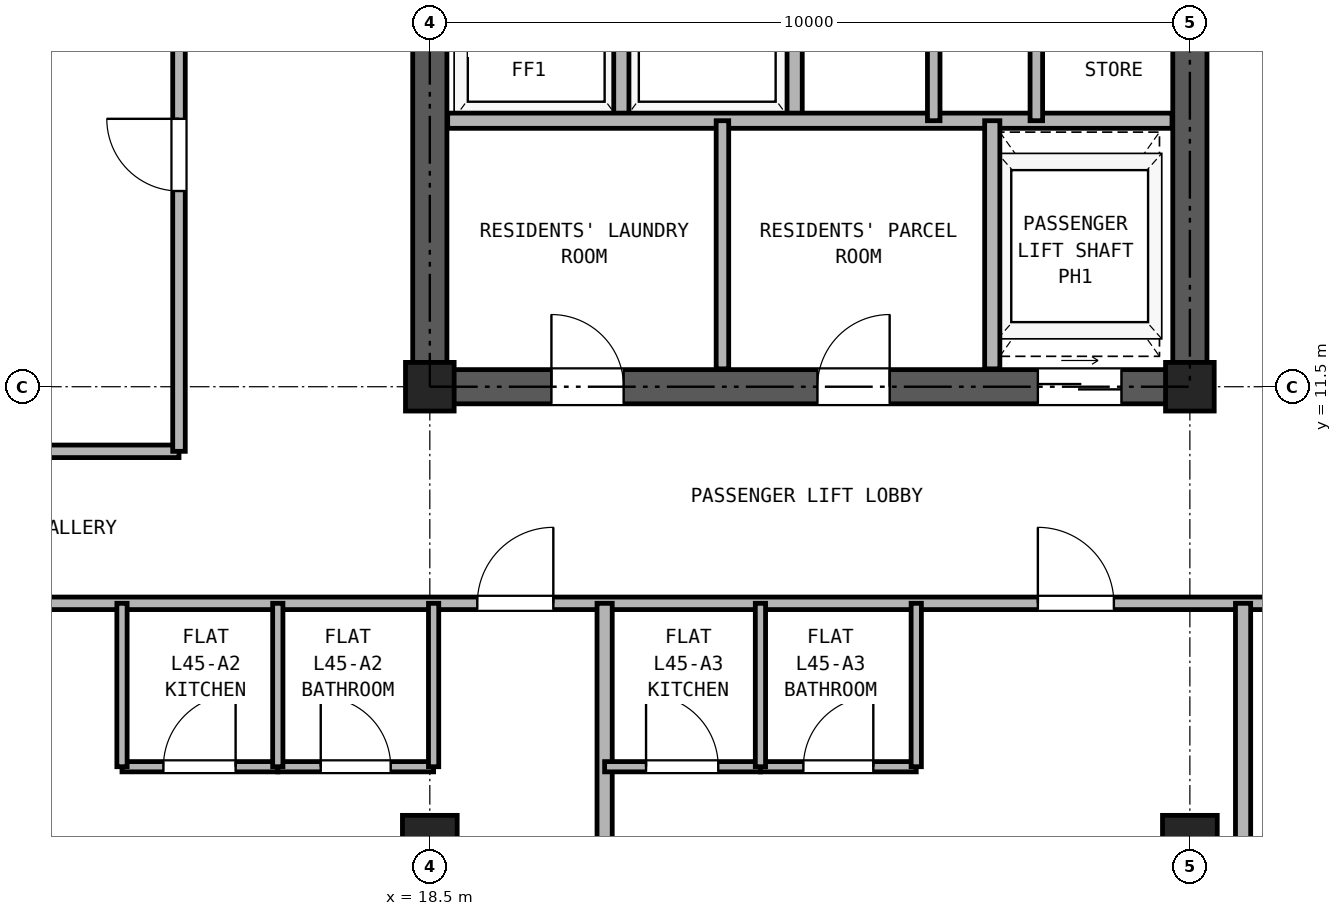
"""IFC4 building model, lengths in metres.
Left out: names, types, materials, properties, quantities, classifications, styles, units other than length and angle.
Written with IfcOpenShell. Run it as: python <this file> out.ifc"""

import sys

from ifc_helpers import new_model, si_unit, direction, frame, frame_2d, origin, origin_2d, place, context, subcontext, project, spatial, rectangle, hollow_rectangle, extrude, source, transform, mapped, element, fill, save


model = new_model("IFC4")
c1 = context("Model", 3, precision=1e-05, world=origin(), true_north=direction((0.0, 1.0)))
c2 = subcontext(c1, "Body", "Model", "MODEL_VIEW")
j1 = project(units=[si_unit("LENGTHUNIT", "METRE"), si_unit("PLANEANGLEUNIT", "RADIAN")], contexts=[c1])
p1 = place(None, origin())
s1 = spatial("IfcSite", under=j1, at=p1, CompositionType="ELEMENT")
p2 = place(p1, origin())
s2 = spatial("IfcBuilding", under=s1, at=p2, CompositionType="ELEMENT")
p3 = place(p2, frame((0.0, 0.0, 162.5)))
s3 = spatial("IfcBuildingStorey", under=s2, at=p3, CompositionType="ELEMENT", Elevation=162.5)
m1 = source(origin(), c2, "Body", "SweptSolid", [
    extrude(hollow_rectangle(XDim=0.72, YDim=0.72, WallThickness=0.04, at=origin_2d()), origin(), (0.0, 0.0, 1.0), 2.95),
])
p4 = place(p3, frame((18.5, 5.5, 0.0), z_axis=(0.0, 0.0, 1.0), x_axis=(1.0, 0.0, 0.0)))
e1 = element("IfcColumn", 1, at=p4, inside=s3, PredefinedType="COLUMN", context=c2, shape_type="MappedRepresentation", body=[
    mapped(m1, transform((0.0, 0.0, 0.0), x_axis=(1.0, 0.0, 0.0), y_axis=(0.0, 1.0, 0.0), z_axis=(0.0, 0.0, 1.0), scale=1.0)),
])
m2 = source(origin(), c2, "Body", "SweptSolid", [
    extrude(hollow_rectangle(XDim=0.64, YDim=0.64, WallThickness=0.035, at=origin_2d()), origin(), (0.0, 0.0, 1.0), 2.95),
])
p5 = place(p3, frame((18.5, 11.5, 0.0), z_axis=(0.0, 0.0, 1.0), x_axis=(1.0, 0.0, 0.0)))
e2 = element("IfcColumn", 2, at=p5, inside=s3, PredefinedType="COLUMN", context=c2, shape_type="MappedRepresentation", body=[
    mapped(m2, transform((0.0, 0.0, 0.0), x_axis=(1.0, 0.0, 0.0), y_axis=(0.0, 1.0, 0.0), z_axis=(0.0, 0.0, 1.0), scale=1.0)),
])
p6 = place(p3, frame((28.5, 5.5, 0.0), z_axis=(0.0, 0.0, 1.0), x_axis=(1.0, 0.0, 0.0)))
e3 = element("IfcColumn", 3, at=p6, inside=s3, PredefinedType="COLUMN", context=c2, shape_type="MappedRepresentation", body=[
    mapped(m1, transform((0.0, 0.0, 0.0), x_axis=(1.0, 0.0, 0.0), y_axis=(0.0, 1.0, 0.0), z_axis=(0.0, 0.0, 1.0), scale=1.0)),
])
p7 = place(p3, frame((28.5, 11.5, 0.0), z_axis=(0.0, 0.0, 1.0), x_axis=(1.0, 0.0, 0.0)))
e4 = element("IfcColumn", 4, at=p7, inside=s3, PredefinedType="COLUMN", context=c2, shape_type="MappedRepresentation", body=[
    mapped(m2, transform((0.0, 0.0, 0.0), x_axis=(1.0, 0.0, 0.0), y_axis=(0.0, 1.0, 0.0), z_axis=(0.0, 0.0, 1.0), scale=1.0)),
])
p8 = place(p3, frame((18.275, 11.5, 0.0), z_axis=(0.0, 0.0, 1.0), x_axis=(1.0, 0.0, 0.0)))
e5 = element("IfcWall", 5, at=p8, inside=s3, PredefinedType="SHEAR", context=c2, shape_type="SweptSolid", body=[
    extrude(rectangle(XDim=10.45, YDim=0.45, at=frame_2d((5.225, 0.0))), origin(), (0.0, 0.0, 1.0), 2.95),
])
p9 = place(p8, frame((1.825, 0.0, 0.0)))
e6 = element("IfcOpeningElement", 6, at=p9, cuts=e5, PredefinedType="OPENING", context=c2, shape_type="SweptSolid", body=[
    extrude(rectangle(XDim=0.95, YDim=2.15, at=frame_2d((0.475, 1.075))), frame((0.0, 0.235, 0.0), z_axis=(0.0, -1.0, 0.0), x_axis=(1.0, 0.0, 0.0)), (0.0, 0.0, 1.0), 0.47),
])
p10 = place(p8, frame((5.325, 0.0, 0.0)))
e7 = element("IfcOpeningElement", 7, at=p10, cuts=e5, PredefinedType="OPENING", context=c2, shape_type="SweptSolid", body=[
    extrude(rectangle(XDim=0.95, YDim=2.15, at=frame_2d((0.475, 1.075))), frame((0.0, 0.235, 0.0), z_axis=(0.0, -1.0, 0.0), x_axis=(1.0, 0.0, 0.0)), (0.0, 0.0, 1.0), 0.47),
])
p11 = place(p8, frame((8.225, 0.0, 0.0)))
e8 = element("IfcOpeningElement", 8, at=p11, cuts=e5, PredefinedType="OPENING", context=c2, shape_type="SweptSolid", body=[
    extrude(rectangle(XDim=1.1, YDim=2.25, at=frame_2d((0.55, 1.125))), frame((0.0, 0.235, 0.0), z_axis=(0.0, -1.0, 0.0), x_axis=(1.0, 0.0, 0.0)), (0.0, 0.0, 1.0), 0.47),
])
p12 = place(p3, frame((18.5, 11.725, 0.0), z_axis=(0.0, 0.0, 1.0), x_axis=(0.0, 1.0, 0.0)))
e9 = element("IfcWall", 9, at=p12, inside=s3, PredefinedType="SHEAR", context=c2, shape_type="SweptSolid", body=[
    extrude(rectangle(XDim=16.8, YDim=0.45, at=frame_2d((8.4, 0.0))), origin(), (0.0, 0.0, 1.0), 2.95),
])
p13 = place(p12, frame((7.425, 0.0, 0.0)))
e10 = element("IfcOpeningElement", 10, at=p13, cuts=e9, PredefinedType="OPENING", context=c2, shape_type="SweptSolid", body=[
    extrude(rectangle(XDim=1.15, YDim=2.2, at=frame_2d((0.575, 1.1))), frame((0.0, 0.235, 0.0), z_axis=(0.0, -1.0, 0.0), x_axis=(1.0, 0.0, 0.0)), (0.0, 0.0, 1.0), 0.47),
])
p14 = place(p3, frame((28.5, 11.725, 0.0), z_axis=(0.0, 0.0, 1.0), x_axis=(0.0, 1.0, 0.0)))
e11 = element("IfcWall", 11, at=p14, inside=s3, PredefinedType="SHEAR", context=c2, shape_type="SweptSolid", body=[
    extrude(rectangle(XDim=16.8, YDim=0.45, at=frame_2d((8.4, 0.0))), origin(), (0.0, 0.0, 1.0), 2.95),
])
p15 = place(p14, frame((7.425, 0.0, 0.0)))
e12 = element("IfcOpeningElement", 12, at=p15, cuts=e11, PredefinedType="OPENING", context=c2, shape_type="SweptSolid", body=[
    extrude(rectangle(XDim=1.15, YDim=2.2, at=frame_2d((0.575, 1.1))), frame((0.0, 0.235, 0.0), z_axis=(0.0, -1.0, 0.0), x_axis=(1.0, 0.0, 0.0)), (0.0, 0.0, 1.0), 0.47),
])
for number, where, z_axis, x_axis in (
    (13, (21.02, 15.0, 0.0), (0.0, 0.0, 1.0), (0.0, 1.0, 0.0)),
    (14, (23.3, 15.0, 0.0), (0.0, 0.0, 1.0), (0.0, 1.0, 0.0)),
):
    element("IfcWall", number, at=place(p3, frame(where, z_axis=z_axis, x_axis=x_axis)), inside=s3, PredefinedType="PARTITIONING", context=c2, shape_type="SweptSolid", body=[
        extrude(rectangle(XDim=3.0, YDim=0.2, at=frame_2d((1.5, 0.0))), origin(), (0.0, 0.0, 1.0), 2.95),
    ])
p16 = place(p3, frame((18.735, 15.0, 0.0), z_axis=(0.0, 0.0, 1.0), x_axis=(1.0, 0.0, 0.0)))
e15 = element("IfcWall", 15, at=p16, inside=s3, PredefinedType="PARTITIONING", context=c2, shape_type="SweptSolid", body=[
    extrude(rectangle(XDim=9.53, YDim=0.2, at=frame_2d((4.765, 0.0))), origin(), (0.0, 0.0, 1.0), 2.95),
])
p17 = place(p3, frame((25.13, 15.0, 0.0), z_axis=(0.0, 0.0, 1.0), x_axis=(0.0, 1.0, 0.0)))
e16 = element("IfcWall", 16, at=p17, inside=s3, PredefinedType="PARTITIONING", context=c2, shape_type="SweptSolid", body=[
    extrude(rectangle(XDim=3.0, YDim=0.165, at=frame_2d((1.5, 0.0))), origin(), (0.0, 0.0, 1.0), 2.95),
])
p18 = place(p3, frame((26.48, 15.0, 0.0), z_axis=(0.0, 0.0, 1.0), x_axis=(0.0, 1.0, 0.0)))
e17 = element("IfcWall", 17, at=p18, inside=s3, PredefinedType="PARTITIONING", context=c2, shape_type="SweptSolid", body=[
    extrude(rectangle(XDim=3.0, YDim=0.165, at=frame_2d((1.5, 0.0))), origin(), (0.0, 0.0, 1.0), 2.95),
])
p19 = place(p18, frame((1.05, 0.0, 0.0)))
e18 = element("IfcOpeningElement", 18, at=p19, cuts=e17, PredefinedType="OPENING", context=c2, shape_type="SweptSolid", body=[
    extrude(rectangle(XDim=0.9, YDim=2.05, at=frame_2d((0.45, 1.025))), frame((0.0, 0.093, 0.0), z_axis=(0.0, -1.0, 0.0), x_axis=(1.0, 0.0, 0.0)), (0.0, 0.0, 1.0), 0.185),
])
p20 = place(p3, frame((22.35, 11.735, 0.0), z_axis=(0.0, 0.0, 1.0), x_axis=(0.0, 1.0, 0.0)))
e19 = element("IfcWall", 19, at=p20, inside=s3, PredefinedType="PARTITIONING", context=c2, shape_type="SweptSolid", body=[
    extrude(rectangle(XDim=3.265, YDim=0.165, at=frame_2d((1.632, 0.0))), origin(), (0.0, 0.0, 1.0), 2.95),
])
p21 = place(p3, frame((25.9, 11.735, 0.0), z_axis=(0.0, 0.0, 1.0), x_axis=(0.0, 1.0, 0.0)))
e20 = element("IfcWall", 20, at=p21, inside=s3, PredefinedType="PARTITIONING", context=c2, shape_type="SweptSolid", body=[
    extrude(rectangle(XDim=3.265, YDim=0.2, at=frame_2d((1.632, 0.0))), origin(), (0.0, 0.0, 1.0), 2.95),
])
p22 = place(p3, frame((0.16, 8.65, 0.0), z_axis=(0.0, 0.0, 1.0), x_axis=(1.0, 0.0, 0.0)))
e21 = element("IfcWall", 21, at=p22, inside=s3, PredefinedType="PARTITIONING", context=c2, shape_type="SweptSolid", body=[
    extrude(rectangle(XDim=41.48, YDim=0.165, at=frame_2d((20.74, 0.0))), origin(), (0.0, 0.0, 1.0), 2.583),
])
p23 = place(p22, frame((9.39, 0.0, 0.0)))
e22 = element("IfcOpeningElement", 22, at=p23, cuts=e21, PredefinedType="OPENING", context=c2, shape_type="SweptSolid", body=[
    extrude(rectangle(XDim=1.0, YDim=2.15, at=frame_2d((0.5, 1.075))), frame((0.0, 0.093, 0.0), z_axis=(0.0, -1.0, 0.0), x_axis=(1.0, 0.0, 0.0)), (0.0, 0.0, 1.0), 0.185),
])
p24 = place(p22, frame((18.965, 0.0, 0.0)))
e23 = element("IfcOpeningElement", 23, at=p24, cuts=e21, PredefinedType="OPENING", context=c2, shape_type="SweptSolid", body=[
    extrude(rectangle(XDim=1.0, YDim=2.15, at=frame_2d((0.5, 1.075))), frame((0.0, 0.093, 0.0), z_axis=(0.0, -1.0, 0.0), x_axis=(1.0, 0.0, 0.0)), (0.0, 0.0, 1.0), 0.185),
])
p25 = place(p22, frame((26.34, 0.0, 0.0)))
e24 = element("IfcOpeningElement", 24, at=p25, cuts=e21, PredefinedType="OPENING", context=c2, shape_type="SweptSolid", body=[
    extrude(rectangle(XDim=1.0, YDim=2.15, at=frame_2d((0.5, 1.075))), frame((0.0, 0.093, 0.0), z_axis=(0.0, -1.0, 0.0), x_axis=(1.0, 0.0, 0.0)), (0.0, 0.0, 1.0), 0.185),
])
p26 = place(p22, frame((31.715, 0.0, 0.0)))
e25 = element("IfcOpeningElement", 25, at=p26, cuts=e21, PredefinedType="OPENING", context=c2, shape_type="SweptSolid", body=[
    extrude(rectangle(XDim=1.0, YDim=2.15, at=frame_2d((0.5, 1.075))), frame((0.0, 0.093, 0.0), z_axis=(0.0, -1.0, 0.0), x_axis=(1.0, 0.0, 0.0)), (0.0, 0.0, 1.0), 0.185),
])
p27 = place(p3, frame((7.6, 10.65, 0.0), z_axis=(0.0, 0.0, 1.0), x_axis=(1.0, 0.0, 0.0)))
e26 = element("IfcWall", 26, at=p27, inside=s3, PredefinedType="PARTITIONING", context=c2, shape_type="SweptSolid", body=[
    extrude(rectangle(XDim=7.6, YDim=0.165, at=frame_2d((3.8, 0.0))), origin(), (0.0, 0.0, 1.0), 2.95),
])
p28 = place(p3, frame((15.2, 10.65, 0.0), z_axis=(0.0, 0.0, 1.0), x_axis=(0.0, 1.0, 0.0)))
e27 = element("IfcWall", 27, at=p28, inside=s3, PredefinedType="PARTITIONING", context=c2, shape_type="SweptSolid", body=[
    extrude(rectangle(XDim=24.49, YDim=0.165, at=frame_2d((12.245, 0.0))), origin(), (0.0, 0.0, 1.0), 2.95),
])
p29 = place(p28, frame((3.425, 0.0, 0.0)))
e28 = element("IfcOpeningElement", 28, at=p29, cuts=e27, PredefinedType="OPENING", context=c2, shape_type="SweptSolid", body=[
    extrude(rectangle(XDim=0.95, YDim=2.15, at=frame_2d((0.475, 1.075))), frame((0.0, 0.093, 0.0), z_axis=(0.0, -1.0, 0.0), x_axis=(1.0, 0.0, 0.0)), (0.0, 0.0, 1.0), 0.185),
])
p30 = place(p28, frame((10.85, 0.0, 0.0)))
e29 = element("IfcOpeningElement", 29, at=p30, cuts=e27, PredefinedType="OPENING", context=c2, shape_type="SweptSolid", body=[
    extrude(rectangle(XDim=0.95, YDim=2.15, at=frame_2d((0.475, 1.075))), frame((0.0, 0.093, 0.0), z_axis=(0.0, -1.0, 0.0), x_axis=(1.0, 0.0, 0.0)), (0.0, 0.0, 1.0), 0.185),
])
p31 = place(p28, frame((16.7, 0.0, 0.0)))
e30 = element("IfcOpeningElement", 30, at=p31, cuts=e27, PredefinedType="OPENING", context=c2, shape_type="SweptSolid", body=[
    extrude(rectangle(XDim=0.95, YDim=2.15, at=frame_2d((0.475, 1.075))), frame((0.0, 0.093, 0.0), z_axis=(0.0, -1.0, 0.0), x_axis=(1.0, 0.0, 0.0)), (0.0, 0.0, 1.0), 0.185),
])
p32 = place(p28, frame((21.52, 0.0, 0.0)))
e31 = element("IfcOpeningElement", 31, at=p32, cuts=e27, PredefinedType="OPENING", context=c2, shape_type="SweptSolid", body=[
    extrude(rectangle(XDim=0.92, YDim=2.1, at=frame_2d((0.46, 1.05))), frame((0.0, 0.093, 0.0), z_axis=(0.0, -1.0, 0.0), x_axis=(1.0, 0.0, 0.0)), (0.0, 0.0, 1.0), 0.185),
])
p33 = place(p3, frame((14.45, 6.5, 0.0), z_axis=(0.0, 0.0, 1.0), x_axis=(1.0, 0.0, 0.0)))
e32 = element("IfcWall", 32, at=p33, inside=s3, PredefinedType="PARTITIONING", context=c2, shape_type="SweptSolid", body=[
    extrude(rectangle(XDim=2.05, YDim=0.135, at=frame_2d((1.025, 0.0))), origin(), (0.0, 0.0, 1.0), 2.95),
])
p34 = place(p33, frame((0.545, 0.0, 0.0)))
e33 = element("IfcOpeningElement", 33, at=p34, cuts=e32, PredefinedType="OPENING", context=c2, shape_type="SweptSolid", body=[
    extrude(rectangle(XDim=0.95, YDim=2.15, at=frame_2d((0.475, 1.075))), frame((0.0, 0.077, 0.0), z_axis=(0.0, -1.0, 0.0), x_axis=(1.0, 0.0, 0.0)), (0.0, 0.0, 1.0), 0.155),
])
p35 = place(p3, frame((16.5, 6.5, 0.0), z_axis=(0.0, 0.0, 1.0), x_axis=(1.0, 0.0, 0.0)))
e34 = element("IfcWall", 34, at=p35, inside=s3, PredefinedType="PARTITIONING", context=c2, shape_type="SweptSolid", body=[
    extrude(rectangle(XDim=2.05, YDim=0.135, at=frame_2d((1.025, 0.0))), origin(), (0.0, 0.0, 1.0), 2.95),
])
p36 = place(p35, frame((0.565, 0.0, 0.0)))
e35 = element("IfcOpeningElement", 35, at=p36, cuts=e34, PredefinedType="OPENING", context=c2, shape_type="SweptSolid", body=[
    extrude(rectangle(XDim=0.92, YDim=2.1, at=frame_2d((0.46, 1.05))), frame((0.0, 0.077, 0.0), z_axis=(0.0, -1.0, 0.0), x_axis=(1.0, 0.0, 0.0)), (0.0, 0.0, 1.0), 0.155),
])
for number, where, z_axis, x_axis in (
    (36, (14.45, 6.5, 0.0), (0.0, 0.0, 1.0), (0.0, 1.0, 0.0)),
    (37, (16.5, 6.5, 0.0), (0.0, 0.0, 1.0), (0.0, 1.0, 0.0)),
):
    element("IfcWall", number, at=place(p3, frame(where, z_axis=z_axis, x_axis=x_axis)), inside=s3, PredefinedType="PARTITIONING", context=c2, shape_type="SweptSolid", body=[
        extrude(rectangle(XDim=2.15, YDim=0.135, at=frame_2d((1.075, 0.0))), origin(), (0.0, 0.0, 1.0), 2.95),
    ])
p37 = place(p3, frame((18.55, 6.5, 0.0), z_axis=(0.0, 0.0, 1.0), x_axis=(0.0, 1.0, 0.0)))
e38 = element("IfcWall", 38, at=p37, inside=s3, PredefinedType="PARTITIONING", context=c2, shape_type="SweptSolid", body=[
    extrude(rectangle(XDim=2.15, YDim=0.135, at=frame_2d((1.075, 0.0))), origin(), (0.0, 0.0, 1.0), 2.323),
])
p38 = place(p3, frame((20.8, 0.16, 0.0), z_axis=(0.0, 0.0, 1.0), x_axis=(0.0, 1.0, 0.0)))
e39 = element("IfcWall", 39, at=p38, inside=s3, PredefinedType="PARTITIONING", context=c2, shape_type="SweptSolid", body=[
    extrude(rectangle(XDim=8.49, YDim=0.2, at=frame_2d((4.245, 0.0))), origin(), (0.0, 0.0, 1.0), 2.95),
])
p39 = place(p3, frame((20.8, 6.5, 0.0), z_axis=(0.0, 0.0, 1.0), x_axis=(1.0, 0.0, 0.0)))
e40 = element("IfcWall", 40, at=p39, inside=s3, PredefinedType="PARTITIONING", context=c2, shape_type="SweptSolid", body=[
    extrude(rectangle(XDim=2.05, YDim=0.135, at=frame_2d((1.025, 0.0))), origin(), (0.0, 0.0, 1.0), 2.95),
])
p40 = place(p39, frame((0.545, 0.0, 0.0)))
e41 = element("IfcOpeningElement", 41, at=p40, cuts=e40, PredefinedType="OPENING", context=c2, shape_type="SweptSolid", body=[
    extrude(rectangle(XDim=0.95, YDim=2.15, at=frame_2d((0.475, 1.075))), frame((0.0, 0.077, 0.0), z_axis=(0.0, -1.0, 0.0), x_axis=(1.0, 0.0, 0.0)), (0.0, 0.0, 1.0), 0.155),
])
p41 = place(p3, frame((22.85, 6.5, 0.0), z_axis=(0.0, 0.0, 1.0), x_axis=(1.0, 0.0, 0.0)))
e42 = element("IfcWall", 42, at=p41, inside=s3, PredefinedType="PARTITIONING", context=c2, shape_type="SweptSolid", body=[
    extrude(rectangle(XDim=2.05, YDim=0.135, at=frame_2d((1.025, 0.0))), origin(), (0.0, 0.0, 1.0), 2.95),
])
p42 = place(p41, frame((0.565, 0.0, 0.0)))
e43 = element("IfcOpeningElement", 43, at=p42, cuts=e42, PredefinedType="OPENING", context=c2, shape_type="SweptSolid", body=[
    extrude(rectangle(XDim=0.92, YDim=2.1, at=frame_2d((0.46, 1.05))), frame((0.0, 0.077, 0.0), z_axis=(0.0, -1.0, 0.0), x_axis=(1.0, 0.0, 0.0)), (0.0, 0.0, 1.0), 0.155),
])
for number, where, z_axis, x_axis in (
    (44, (22.85, 6.5, 0.0), (0.0, 0.0, 1.0), (0.0, 1.0, 0.0)),
    (45, (24.9, 6.5, 0.0), (0.0, 0.0, 1.0), (0.0, 1.0, 0.0)),
):
    element("IfcWall", number, at=place(p3, frame(where, z_axis=z_axis, x_axis=x_axis)), inside=s3, PredefinedType="PARTITIONING", context=c2, shape_type="SweptSolid", body=[
        extrude(rectangle(XDim=2.15, YDim=0.135, at=frame_2d((1.075, 0.0))), origin(), (0.0, 0.0, 1.0), 2.95),
    ])
p43 = place(p3, frame((29.2, 0.16, 0.0), z_axis=(0.0, 0.0, 1.0), x_axis=(0.0, 1.0, 0.0)))
e46 = element("IfcWall", 46, at=p43, inside=s3, PredefinedType="PARTITIONING", context=c2, shape_type="SweptSolid", body=[
    extrude(rectangle(XDim=8.49, YDim=0.2, at=frame_2d((4.245, 0.0))), origin(), (0.0, 0.0, 1.0), 2.95),
])
p44 = place(p9, frame((0.95, 0.0, 0.0), z_axis=(0.0, 0.0, 1.0), x_axis=(-1.0, 0.0, 0.0)))
e47 = element("IfcDoor", 47, at=p44, inside=s3, OperationType="SINGLE_SWING_LEFT", PredefinedType="DOOR", context=c2, shape_type="SweptSolid", body=[
    extrude(rectangle(XDim=0.95, YDim=2.15, at=frame_2d((0.475, 1.075))), frame((0.0, 0.025, 0.0), z_axis=(0.0, -1.0, 0.0), x_axis=(1.0, 0.0, 0.0)), (0.0, 0.0, 1.0), 0.05),
])
fill(e6, e47)
p45 = place(p10, frame((0.95, 0.0, 0.0), z_axis=(0.0, 0.0, 1.0), x_axis=(-1.0, 0.0, 0.0)))
e48 = element("IfcDoor", 48, at=p45, inside=s3, OperationType="SINGLE_SWING_RIGHT", PredefinedType="DOOR", context=c2, shape_type="SweptSolid", body=[
    extrude(rectangle(XDim=0.95, YDim=2.15, at=frame_2d((0.475, 1.075))), frame((0.0, 0.025, 0.0), z_axis=(0.0, -1.0, 0.0), x_axis=(1.0, 0.0, 0.0)), (0.0, 0.0, 1.0), 0.05),
])
fill(e7, e48)
p46 = place(p11, frame((1.1, 0.0, 0.0), z_axis=(0.0, 0.0, 1.0), x_axis=(-1.0, 0.0, 0.0)))
e49 = element("IfcDoor", 49, at=p46, inside=s3, OperationType="DOUBLE_DOOR_SLIDING", PredefinedType="DOOR", context=c2, shape_type="SweptSolid", body=[
    extrude(rectangle(XDim=1.1, YDim=2.25, at=frame_2d((0.55, 1.125))), frame((0.0, 0.025, 0.0), z_axis=(0.0, -1.0, 0.0), x_axis=(1.0, 0.0, 0.0)), (0.0, 0.0, 1.0), 0.05),
])
fill(e8, e49)
p47 = place(p34, origin())
e50 = element("IfcDoor", 50, at=p47, inside=s3, OperationType="SINGLE_SWING_RIGHT", PredefinedType="DOOR", context=c2, shape_type="SweptSolid", body=[
    extrude(rectangle(XDim=0.95, YDim=2.15, at=frame_2d((0.475, 1.075))), frame((0.0, 0.025, 0.0), z_axis=(0.0, -1.0, 0.0), x_axis=(1.0, 0.0, 0.0)), (0.0, 0.0, 1.0), 0.05),
])
fill(e33, e50)
p48 = place(p36, origin())
e51 = element("IfcDoor", 51, at=p48, inside=s3, OperationType="SINGLE_SWING_LEFT", PredefinedType="DOOR", context=c2, shape_type="SweptSolid", body=[
    extrude(rectangle(XDim=0.92, YDim=2.1, at=frame_2d((0.46, 1.05))), frame((0.0, 0.025, 0.0), z_axis=(0.0, -1.0, 0.0), x_axis=(1.0, 0.0, 0.0)), (0.0, 0.0, 1.0), 0.05),
])
fill(e35, e51)
p49 = place(p24, frame((1.0, 0.0, 0.0), z_axis=(0.0, 0.0, 1.0), x_axis=(-1.0, 0.0, 0.0)))
e52 = element("IfcDoor", 52, at=p49, inside=s3, OperationType="SINGLE_SWING_RIGHT", PredefinedType="DOOR", context=c2, shape_type="SweptSolid", body=[
    extrude(rectangle(XDim=1.0, YDim=2.15, at=frame_2d((0.5, 1.075))), frame((0.0, 0.025, 0.0), z_axis=(0.0, -1.0, 0.0), x_axis=(1.0, 0.0, 0.0)), (0.0, 0.0, 1.0), 0.05),
])
fill(e23, e52)
p50 = place(p40, origin())
e53 = element("IfcDoor", 53, at=p50, inside=s3, OperationType="SINGLE_SWING_LEFT", PredefinedType="DOOR", context=c2, shape_type="SweptSolid", body=[
    extrude(rectangle(XDim=0.95, YDim=2.15, at=frame_2d((0.475, 1.075))), frame((0.0, 0.025, 0.0), z_axis=(0.0, -1.0, 0.0), x_axis=(1.0, 0.0, 0.0)), (0.0, 0.0, 1.0), 0.05),
])
fill(e41, e53)
p51 = place(p42, origin())
e54 = element("IfcDoor", 54, at=p51, inside=s3, OperationType="SINGLE_SWING_RIGHT", PredefinedType="DOOR", context=c2, shape_type="SweptSolid", body=[
    extrude(rectangle(XDim=0.92, YDim=2.1, at=frame_2d((0.46, 1.05))), frame((0.0, 0.025, 0.0), z_axis=(0.0, -1.0, 0.0), x_axis=(1.0, 0.0, 0.0)), (0.0, 0.0, 1.0), 0.05),
])
fill(e43, e54)
p52 = place(p25, frame((1.0, 0.0, 0.0), z_axis=(0.0, 0.0, 1.0), x_axis=(-1.0, 0.0, 0.0)))
e55 = element("IfcDoor", 55, at=p52, inside=s3, OperationType="SINGLE_SWING_LEFT", PredefinedType="DOOR", context=c2, shape_type="SweptSolid", body=[
    extrude(rectangle(XDim=1.0, YDim=2.15, at=frame_2d((0.5, 1.075))), frame((0.0, 0.025, 0.0), z_axis=(0.0, -1.0, 0.0), x_axis=(1.0, 0.0, 0.0)), (0.0, 0.0, 1.0), 0.05),
])
fill(e24, e55)
p53 = place(p29, frame((0.95, 0.0, 0.0), z_axis=(0.0, 0.0, 1.0), x_axis=(-1.0, 0.0, 0.0)))
e56 = element("IfcDoor", 56, at=p53, inside=s3, OperationType="SINGLE_SWING_RIGHT", PredefinedType="DOOR", context=c2, shape_type="SweptSolid", body=[
    extrude(rectangle(XDim=0.95, YDim=2.15, at=frame_2d((0.475, 1.075))), frame((0.0, 0.025, 0.0), z_axis=(0.0, -1.0, 0.0), x_axis=(1.0, 0.0, 0.0)), (0.0, 0.0, 1.0), 0.05),
])
fill(e28, e56)
save(model, sys.argv[1])
